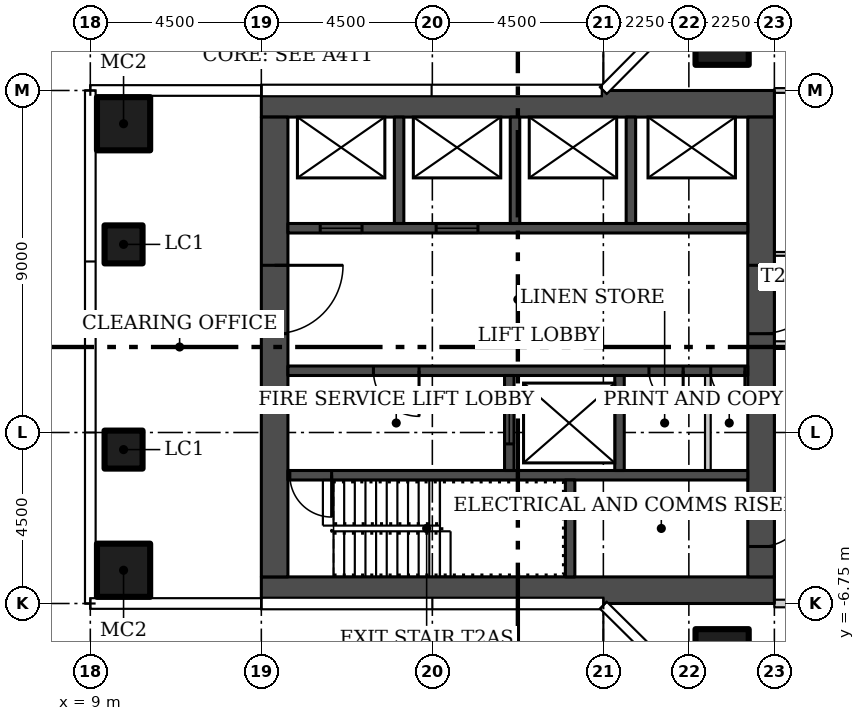
"""IFC4 building model, lengths in metres.
Left out: names, types, materials, properties, quantities, classifications, styles, units other than length and angle.
Written with IfcOpenShell. Run it as: python <this file> out.ifc"""

import sys

from ifc_helpers import new_model, si_unit, direction, frame, frame_2d, origin, origin_2d, place, context, subcontext, project, spatial, rectangle, hollow_rectangle, extrude, element, fill, save


model = new_model("IFC4")
c1 = context("Model", 3, precision=1e-05, world=origin(), true_north=direction((0.0, 1.0)))
c2 = subcontext(c1, "Body", "Model", "MODEL_VIEW")
j1 = project(units=[si_unit("LENGTHUNIT", "METRE"), si_unit("PLANEANGLEUNIT", "RADIAN")], contexts=[c1])
p1 = place(None, origin())
s1 = spatial("IfcSite", under=j1, at=p1, CompositionType="ELEMENT")
p2 = place(p1, origin())
s2 = spatial("IfcBuilding", under=s1, at=p2, CompositionType="ELEMENT")
p3 = place(p2, frame((0.0, 0.0, 61.5)))
s3 = spatial("IfcBuildingStorey", under=s2, at=p3, CompositionType="ELEMENT", Elevation=61.5)
for number, where in (
    (1, (25.625, 8.125, 0.0)),
    (2, (25.625, -8.125, 0.0)),
    (3, (9.875, -5.875, 0.0)),
    (4, (9.875, 5.875, 0.0)),
):
    element("IfcColumn", number, at=place(p3, frame(where)), inside=s3, PredefinedType="COLUMN", context=c2, shape_type="SweptSolid", body=[
        extrude(hollow_rectangle(XDim=1.4, YDim=1.4, WallThickness=0.05, at=origin_2d()), origin(), (0.0, 0.0, 1.0), 3.55),
    ])
for number, where in (
    (5, (9.875, -2.7, 0.0)),
    (6, (9.875, 2.7, 0.0)),
):
    element("IfcColumn", number, at=place(p3, frame(where)), inside=s3, PredefinedType="COLUMN", context=c2, shape_type="SweptSolid", body=[
        extrude(hollow_rectangle(XDim=1.0, YDim=1.0, WallThickness=0.04, at=origin_2d()), origin(), (0.0, 0.0, 1.0), 3.55),
    ])
p4 = place(p3, frame((27.0, 2.45, 0.0)))
e7 = element("IfcWall", 7, at=p4, inside=s3, PredefinedType="PARTITIONING", context=c2, shape_type="SweptSolid", body=[
    extrude(rectangle(XDim=5.325, YDim=0.1, at=frame_2d((2.663, 0.0))), origin(), (0.0, 0.0, 1.0), 3.55),
])
p5 = place(p4, frame((3.363, 0.0, 0.0)))
e8 = element("IfcOpeningElement", 8, at=p5, cuts=e7, PredefinedType="OPENING", context=c2, shape_type="SweptSolid", body=[
    extrude(rectangle(XDim=0.9, YDim=2.1, at=frame_2d((0.45, 1.05))), frame((0.0, 0.06, 0.0), z_axis=(0.0, -1.0, 0.0), x_axis=(1.0, 0.0, 0.0)), (0.0, 0.0, 1.0), 0.12),
])
p6 = place(p4, frame((0.738, 0.0, 0.0)))
e9 = element("IfcOpeningElement", 9, at=p6, cuts=e7, PredefinedType="OPENING", context=c2, shape_type="SweptSolid", body=[
    extrude(rectangle(XDim=0.9, YDim=2.1, at=frame_2d((0.45, 1.05))), frame((0.0, 0.06, 0.0), z_axis=(0.0, -1.0, 0.0), x_axis=(1.0, 0.0, 0.0)), (0.0, 0.0, 1.0), 0.12),
])
p7 = place(p3, frame((37.6, 0.05, 0.0), z_axis=(0.0, 0.0, 1.0), x_axis=(-1.0, 0.0, 0.0)))
e10 = element("IfcWall", 10, at=p7, inside=s3, PredefinedType="PARTITIONING", context=c2, shape_type="SweptSolid", body=[
    extrude(rectangle(XDim=10.6, YDim=0.2, at=frame_2d((5.3, 0.0))), origin(), (0.0, 0.0, 1.0), 3.55),
])
p8 = place(p7, frame((4.9, 0.0, 0.0)))
e11 = element("IfcOpeningElement", 11, at=p8, cuts=e10, PredefinedType="OPENING", context=c2, shape_type="SweptSolid", body=[
    extrude(rectangle(XDim=0.9, YDim=2.1, at=frame_2d((0.45, 1.05))), frame((0.0, 0.11, 0.0), z_axis=(0.0, -1.0, 0.0), x_axis=(1.0, 0.0, 0.0)), (0.0, 0.0, 1.0), 0.22),
])
p9 = place(p3, frame((27.0, 6.75, 0.0)))
e12 = element("IfcWall", 12, at=p9, inside=s3, PredefinedType="PARTITIONING", context=c2, shape_type="SweptSolid", body=[
    extrude(rectangle(XDim=5.325, YDim=0.125, at=frame_2d((2.663, 0.0))), origin(), (0.0, 0.0, 1.0), 3.55),
])
p10 = place(p3, frame((37.6, -6.75, 0.0), z_axis=(0.0, 0.0, 1.0), x_axis=(-1.0, 0.0, 0.0)))
e13 = element("IfcWall", 13, at=p10, inside=s3, PredefinedType="PARTITIONING", context=c2, shape_type="SweptSolid", body=[
    extrude(rectangle(XDim=10.6, YDim=0.2, at=frame_2d((5.3, 0.0))), origin(), (0.0, 0.0, 1.0), 3.55),
])
for number, where in (
    (14, (13.5, -6.4, 0.0)),
    (15, (13.5, 6.4, 0.0)),
):
    element("IfcWall", number, at=place(p3, frame(where)), inside=s3, PredefinedType="SHEAR", context=c2, shape_type="SweptSolid", body=[
        extrude(rectangle(XDim=13.5, YDim=0.7, at=frame_2d((6.75, 0.0))), origin(), (0.0, 0.0, 1.0), 3.55),
    ])
p11 = place(p3, frame((13.85, 6.05, 0.0), z_axis=(0.0, 0.0, 1.0), x_axis=(0.0, -1.0, 0.0)))
e16 = element("IfcWall", 16, at=p11, inside=s3, PredefinedType="SHEAR", context=c2, shape_type="SweptSolid", body=[
    extrude(rectangle(XDim=12.1, YDim=0.7, at=frame_2d((6.05, 0.0))), origin(), (0.0, 0.0, 1.0), 3.55),
])
p12 = place(p11, frame((3.9, 0.0, 0.0)))
e17 = element("IfcOpeningElement", 17, at=p12, cuts=e16, PredefinedType="OPENING", context=c2, shape_type="SweptSolid", body=[
    extrude(rectangle(XDim=1.8, YDim=2.4, at=frame_2d((0.9, 1.2))), frame((0.0, 0.36, 0.0), z_axis=(0.0, -1.0, 0.0), x_axis=(1.0, 0.0, 0.0)), (0.0, 0.0, 1.0), 0.72),
])
p13 = place(p3, frame((26.65, 6.05, 0.0), z_axis=(0.0, 0.0, 1.0), x_axis=(0.0, -1.0, 0.0)))
e18 = element("IfcWall", 18, at=p13, inside=s3, PredefinedType="SHEAR", context=c2, shape_type="SweptSolid", body=[
    extrude(rectangle(XDim=12.1, YDim=0.7, at=frame_2d((6.05, 0.0))), origin(), (0.0, 0.0, 1.0), 3.55),
])
p14 = place(p13, frame((10.1, 0.0, 0.0)))
e19 = element("IfcOpeningElement", 19, at=p14, cuts=e18, PredefinedType="OPENING", context=c2, shape_type="SweptSolid", body=[
    extrude(rectangle(XDim=1.2, YDim=2.1, at=frame_2d((0.6, 1.05))), frame((0.0, 0.36, 0.0), z_axis=(0.0, -1.0, 0.0), x_axis=(1.0, 0.0, 0.0)), (0.0, 0.0, 1.0), 0.72),
])
p15 = place(p13, frame((3.9, 0.0, 0.0)))
e20 = element("IfcOpeningElement", 20, at=p15, cuts=e18, PredefinedType="OPENING", context=c2, shape_type="SweptSolid", body=[
    extrude(rectangle(XDim=1.8, YDim=2.4, at=frame_2d((0.9, 1.2))), frame((0.0, 0.36, 0.0), z_axis=(0.0, -1.0, 0.0), x_axis=(1.0, 0.0, 0.0)), (0.0, 0.0, 1.0), 0.72),
])
p16 = place(p3, frame((26.3, -3.375, 0.0), z_axis=(0.0, 0.0, 1.0), x_axis=(-1.0, 0.0, 0.0)))
e21 = element("IfcWall", 21, at=p16, inside=s3, PredefinedType="SHEAR", context=c2, shape_type="SweptSolid", body=[
    extrude(rectangle(XDim=12.1, YDim=0.25, at=frame_2d((6.05, 0.0))), origin(), (0.0, 0.0, 1.0), 3.55),
])
p17 = place(p16, frame((10.95, 0.0, 0.0)))
e22 = element("IfcOpeningElement", 22, at=p17, cuts=e21, PredefinedType="OPENING", context=c2, shape_type="SweptSolid", body=[
    extrude(rectangle(XDim=1.1, YDim=2.1, at=frame_2d((0.55, 1.05))), frame((0.0, 0.135, 0.0), z_axis=(0.0, -1.0, 0.0), x_axis=(1.0, 0.0, 0.0)), (0.0, 0.0, 1.0), 0.27),
])
p18 = place(p3, frame((21.625, -6.05, 0.0), z_axis=(0.0, 0.0, 1.0), x_axis=(0.0, 1.0, 0.0)))
e23 = element("IfcWall", 23, at=p18, inside=s3, PredefinedType="SHEAR", context=c2, shape_type="SweptSolid", body=[
    extrude(rectangle(XDim=2.55, YDim=0.25, at=frame_2d((1.275, 0.0))), origin(), (0.0, 0.0, 1.0), 3.55),
])
p19 = place(p3, frame((26.3, -0.625, 0.0), z_axis=(0.0, 0.0, 1.0), x_axis=(-1.0, 0.0, 0.0)))
e24 = element("IfcWall", 24, at=p19, inside=s3, PredefinedType="SHEAR", context=c2, shape_type="SweptSolid", body=[
    extrude(rectangle(XDim=12.1, YDim=0.25, at=frame_2d((6.05, 0.0))), origin(), (0.0, 0.0, 1.0), 3.55),
])
p20 = place(p19, frame((8.65, 0.0, 0.0)))
e25 = element("IfcOpeningElement", 25, at=p20, cuts=e24, PredefinedType="OPENING", context=c2, shape_type="SweptSolid", body=[
    extrude(rectangle(XDim=1.2, YDim=2.1, at=frame_2d((0.6, 1.05))), frame((0.0, 0.135, 0.0), z_axis=(0.0, -1.0, 0.0), x_axis=(1.0, 0.0, 0.0)), (0.0, 0.0, 1.0), 0.27),
])
p21 = place(p19, frame((1.7, 0.0, 0.0)))
e26 = element("IfcOpeningElement", 26, at=p21, cuts=e24, PredefinedType="OPENING", context=c2, shape_type="SweptSolid", body=[
    extrude(rectangle(XDim=0.9, YDim=2.1, at=frame_2d((0.45, 1.05))), frame((0.0, 0.135, 0.0), z_axis=(0.0, -1.0, 0.0), x_axis=(1.0, 0.0, 0.0)), (0.0, 0.0, 1.0), 0.27),
])
p22 = place(p19, frame((0.075, 0.0, 0.0)))
e27 = element("IfcOpeningElement", 27, at=p22, cuts=e24, PredefinedType="OPENING", context=c2, shape_type="SweptSolid", body=[
    extrude(rectangle(XDim=0.9, YDim=2.1, at=frame_2d((0.45, 1.05))), frame((0.0, 0.135, 0.0), z_axis=(0.0, -1.0, 0.0), x_axis=(1.0, 0.0, 0.0)), (0.0, 0.0, 1.0), 0.27),
])
p23 = place(p3, frame((20.025, -3.25, 0.0), z_axis=(0.0, 0.0, 1.0), x_axis=(0.0, 1.0, 0.0)))
e28 = element("IfcWall", 28, at=p23, inside=s3, PredefinedType="SHEAR", context=c2, shape_type="SweptSolid", body=[
    extrude(rectangle(XDim=2.5, YDim=0.25, at=frame_2d((1.25, 0.0))), origin(), (0.0, 0.0, 1.0), 3.55),
])
p24 = place(p23, frame((0.7, 0.0, 0.0)))
e29 = element("IfcOpeningElement", 29, at=p24, cuts=e28, PredefinedType="OPENING", context=c2, shape_type="SweptSolid", body=[
    extrude(rectangle(XDim=1.1, YDim=2.1, at=frame_2d((0.55, 1.05))), frame((0.0, 0.135, 0.0), z_axis=(0.0, -1.0, 0.0), x_axis=(1.0, 0.0, 0.0)), (0.0, 0.0, 1.0), 0.27),
])
p25 = place(p3, frame((22.925, -3.25, 0.0), z_axis=(0.0, 0.0, 1.0), x_axis=(0.0, 1.0, 0.0)))
e30 = element("IfcWall", 30, at=p25, inside=s3, PredefinedType="SHEAR", context=c2, shape_type="SweptSolid", body=[
    extrude(rectangle(XDim=2.5, YDim=0.25, at=frame_2d((1.25, 0.0))), origin(), (0.0, 0.0, 1.0), 3.55),
])
p26 = place(p3, frame((25.25, -3.25, 0.0), z_axis=(0.0, 0.0, 1.0), x_axis=(0.0, 1.0, 0.0)))
e31 = element("IfcWall", 31, at=p26, inside=s3, PredefinedType="PARTITIONING", context=c2, shape_type="SweptSolid", body=[
    extrude(rectangle(XDim=2.5, YDim=0.15, at=frame_2d((1.25, 0.0))), origin(), (0.0, 0.0, 1.0), 3.55),
])
p27 = place(p3, frame((14.2, 3.125, 0.0)))
e32 = element("IfcWall", 32, at=p27, inside=s3, PredefinedType="SHEAR", context=c2, shape_type="SweptSolid", body=[
    extrude(rectangle(XDim=12.1, YDim=0.25, at=frame_2d((6.05, 0.0))), origin(), (0.0, 0.0, 1.0), 3.55),
])
p28 = place(p27, frame((0.85, 0.0, 0.0)))
e33 = element("IfcOpeningElement", 33, at=p28, cuts=e32, PredefinedType="OPENING", context=c2, shape_type="SweptSolid", body=[
    extrude(rectangle(XDim=1.1, YDim=2.1, at=frame_2d((0.55, 1.05))), frame((0.0, 0.135, 0.0), z_axis=(0.0, -1.0, 0.0), x_axis=(1.0, 0.0, 0.0)), (0.0, 0.0, 1.0), 0.27),
])
p29 = place(p27, frame((3.9, 0.0, 0.0)))
e34 = element("IfcOpeningElement", 34, at=p29, cuts=e32, PredefinedType="OPENING", context=c2, shape_type="SweptSolid", body=[
    extrude(rectangle(XDim=1.1, YDim=2.1, at=frame_2d((0.55, 1.05))), frame((0.0, 0.135, 0.0), z_axis=(0.0, -1.0, 0.0), x_axis=(1.0, 0.0, 0.0)), (0.0, 0.0, 1.0), 0.27),
])
for number, where, z_axis, x_axis in (
    (35, (17.125, 3.25, 0.0), (0.0, 0.0, 1.0), (0.0, 1.0, 0.0)),
    (36, (20.175, 3.25, 0.0), (0.0, 0.0, 1.0), (0.0, 1.0, 0.0)),
    (37, (23.225, 3.25, 0.0), (0.0, 0.0, 1.0), (0.0, 1.0, 0.0)),
):
    element("IfcWall", number, at=place(p3, frame(where, z_axis=z_axis, x_axis=x_axis)), inside=s3, PredefinedType="SHEAR", context=c2, shape_type="SweptSolid", body=[
        extrude(rectangle(XDim=2.8, YDim=0.25, at=frame_2d((1.4, 0.0))), origin(), (0.0, 0.0, 1.0), 3.55),
    ])
p30 = place(p12, origin())
e38 = element("IfcDoor", 38, at=p30, inside=s3, OperationType="DOUBLE_DOOR_SINGLE_SWING", PredefinedType="DOOR", context=c2, shape_type="SweptSolid", body=[
    extrude(rectangle(XDim=1.8, YDim=2.4, at=frame_2d((0.9, 1.2))), frame((0.0, 0.025, 0.0), z_axis=(0.0, -1.0, 0.0), x_axis=(1.0, 0.0, 0.0)), (0.0, 0.0, 1.0), 0.05),
])
fill(e17, e38)
p31 = place(p14, origin())
e39 = element("IfcDoor", 39, at=p31, inside=s3, OperationType="SINGLE_SWING_RIGHT", PredefinedType="DOOR", context=c2, shape_type="SweptSolid", body=[
    extrude(rectangle(XDim=1.2, YDim=2.1, at=frame_2d((0.6, 1.05))), frame((0.0, 0.025, 0.0), z_axis=(0.0, -1.0, 0.0), x_axis=(1.0, 0.0, 0.0)), (0.0, 0.0, 1.0), 0.05),
])
fill(e19, e39)
p32 = place(p15, origin())
e40 = element("IfcDoor", 40, at=p32, inside=s3, OperationType="DOUBLE_DOOR_SINGLE_SWING", PredefinedType="DOOR", context=c2, shape_type="SweptSolid", body=[
    extrude(rectangle(XDim=1.8, YDim=2.4, at=frame_2d((0.9, 1.2))), frame((0.0, 0.025, 0.0), z_axis=(0.0, -1.0, 0.0), x_axis=(1.0, 0.0, 0.0)), (0.0, 0.0, 1.0), 0.05),
])
fill(e20, e40)
p33 = place(p17, origin())
e41 = element("IfcDoor", 41, at=p33, inside=s3, OperationType="SINGLE_SWING_RIGHT", PredefinedType="DOOR", context=c2, shape_type="SweptSolid", body=[
    extrude(rectangle(XDim=1.1, YDim=2.1, at=frame_2d((0.55, 1.05))), frame((0.0, 0.025, 0.0), z_axis=(0.0, -1.0, 0.0), x_axis=(1.0, 0.0, 0.0)), (0.0, 0.0, 1.0), 0.05),
])
fill(e22, e41)
p34 = place(p20, origin())
e42 = element("IfcDoor", 42, at=p34, inside=s3, OperationType="SINGLE_SWING_RIGHT", PredefinedType="DOOR", context=c2, shape_type="SweptSolid", body=[
    extrude(rectangle(XDim=1.2, YDim=2.1, at=frame_2d((0.6, 1.05))), frame((0.0, 0.025, 0.0), z_axis=(0.0, -1.0, 0.0), x_axis=(1.0, 0.0, 0.0)), (0.0, 0.0, 1.0), 0.05),
])
fill(e25, e42)
p35 = place(p21, origin())
e43 = element("IfcDoor", 43, at=p35, inside=s3, OperationType="SINGLE_SWING_LEFT", PredefinedType="DOOR", context=c2, shape_type="SweptSolid", body=[
    extrude(rectangle(XDim=0.9, YDim=2.1, at=frame_2d((0.45, 1.05))), frame((0.0, 0.025, 0.0), z_axis=(0.0, -1.0, 0.0), x_axis=(1.0, 0.0, 0.0)), (0.0, 0.0, 1.0), 0.05),
])
fill(e26, e43)
p36 = place(p22, origin())
e44 = element("IfcDoor", 44, at=p36, inside=s3, OperationType="SINGLE_SWING_LEFT", PredefinedType="DOOR", context=c2, shape_type="SweptSolid", body=[
    extrude(rectangle(XDim=0.9, YDim=2.1, at=frame_2d((0.45, 1.05))), frame((0.0, 0.025, 0.0), z_axis=(0.0, -1.0, 0.0), x_axis=(1.0, 0.0, 0.0)), (0.0, 0.0, 1.0), 0.05),
])
fill(e27, e44)
p37 = place(p24, origin())
e45 = element("IfcDoor", 45, at=p37, inside=s3, OperationType="SLIDING_TO_LEFT", PredefinedType="DOOR", context=c2, shape_type="SweptSolid", body=[
    extrude(rectangle(XDim=1.1, YDim=2.1, at=frame_2d((0.55, 1.05))), frame((0.0, 0.025, 0.0), z_axis=(0.0, -1.0, 0.0), x_axis=(1.0, 0.0, 0.0)), (0.0, 0.0, 1.0), 0.05),
])
fill(e29, e45)
p38 = place(p28, origin())
e46 = element("IfcDoor", 46, at=p38, inside=s3, OperationType="SLIDING_TO_LEFT", PredefinedType="DOOR", context=c2, shape_type="SweptSolid", body=[
    extrude(rectangle(XDim=1.1, YDim=2.1, at=frame_2d((0.55, 1.05))), frame((0.0, 0.025, 0.0), z_axis=(0.0, -1.0, 0.0), x_axis=(1.0, 0.0, 0.0)), (0.0, 0.0, 1.0), 0.05),
])
fill(e33, e46)
p39 = place(p29, origin())
e47 = element("IfcDoor", 47, at=p39, inside=s3, OperationType="SLIDING_TO_LEFT", PredefinedType="DOOR", context=c2, shape_type="SweptSolid", body=[
    extrude(rectangle(XDim=1.1, YDim=2.1, at=frame_2d((0.55, 1.05))), frame((0.0, 0.025, 0.0), z_axis=(0.0, -1.0, 0.0), x_axis=(1.0, 0.0, 0.0)), (0.0, 0.0, 1.0), 0.05),
])
fill(e34, e47)
save(model, sys.argv[1])
